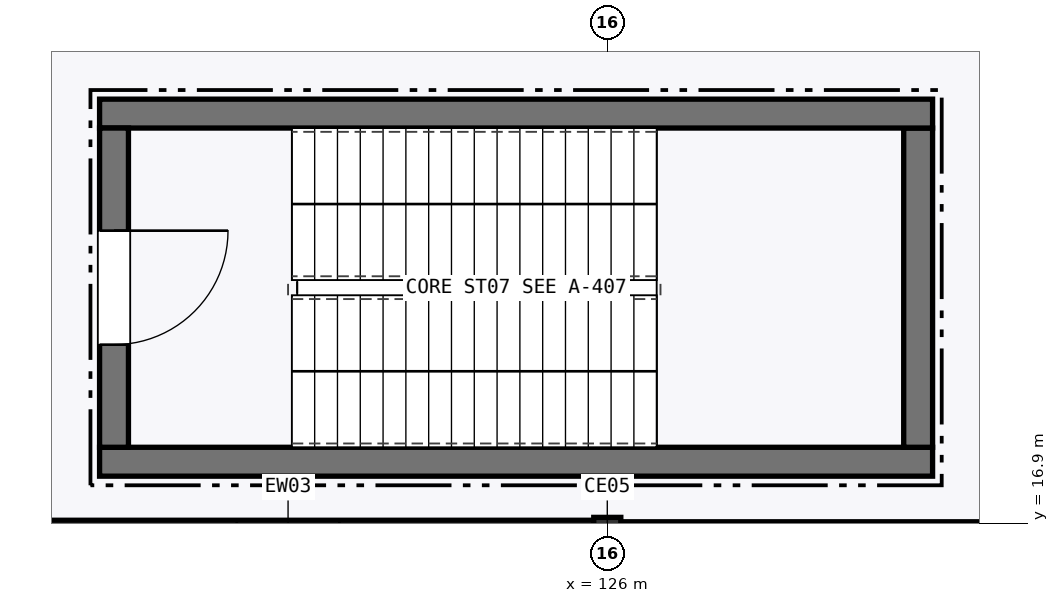
"""IFC4 building model, lengths in metres.
Left out: names, types, materials, properties, quantities, classifications, styles, units other than length and angle.
Written with IfcOpenShell. Run it as: python <this file> out.ifc"""

import sys

from ifc_helpers import new_model, si_unit, direction, frame, frame_2d, origin, origin_2d, place, context, subcontext, project, spatial, rectangle, hollow_circle, extrude, element, fill, save


model = new_model("IFC4")
c1 = context("Model", 3, precision=1e-05, world=origin(), true_north=direction((0.0, 1.0)))
c2 = subcontext(c1, "Body", "Model", "MODEL_VIEW")
j1 = project(units=[si_unit("LENGTHUNIT", "METRE"), si_unit("PLANEANGLEUNIT", "RADIAN")], contexts=[c1])
p1 = place(None, origin())
s1 = spatial("IfcSite", under=j1, at=p1, CompositionType="ELEMENT")
p2 = place(p1, origin())
s2 = spatial("IfcBuilding", under=s1, at=p2, CompositionType="ELEMENT")
p3 = place(p2, frame((0.0, 0.0, 21.6)))
s3 = spatial("IfcBuildingStorey", under=s2, at=p3, CompositionType="ELEMENT", Elevation=21.6)
p4 = place(p3, frame((126.0, 16.8, 0.0), z_axis=(0.0, 0.0, 1.0), x_axis=(1.0, 0.0, 0.0)))
e1 = element("IfcColumn", 1, at=p4, inside=s3, PredefinedType="COLUMN", context=c2, shape_type="SweptSolid", body=[
    extrude(hollow_circle(Radius=0.178, WallThickness=0.014, at=origin_2d()), origin(), (0.0, 0.0, 1.0), 5.1),
])
p5 = place(p3, frame((117.773, 16.8, 0.0), z_axis=(0.0, 0.0, 1.0), x_axis=(1.0, 0.0, 0.0)))
e2 = element("IfcWall", 2, at=p5, inside=s3, PredefinedType="STANDARD", context=c2, shape_type="SweptSolid", body=[
    extrude(rectangle(XDim=8.054, YDim=0.28, at=frame_2d((4.027, 0.0))), origin(), (0.0, 0.0, 1.0), 4.397),
])
p6 = place(p5, frame((3.352, 0.0, 0.95)))
e3 = element("IfcOpeningElement", 3, at=p6, cuts=e2, PredefinedType="OPENING", context=c2, shape_type="SweptSolid", body=[
    extrude(rectangle(XDim=1.35, YDim=2.1, at=frame_2d((0.675, 1.05))), frame((0.0, 0.15, 0.0), z_axis=(0.0, -1.0, 0.0), x_axis=(1.0, 0.0, 0.0)), (0.0, 0.0, 1.0), 0.3),
])
p7 = place(p3, frame((126.173, 16.8, 0.0), z_axis=(0.0, 0.0, 1.0), x_axis=(1.0, 0.0, 0.0)))
e4 = element("IfcWall", 4, at=p7, inside=s3, PredefinedType="STANDARD", context=c2, shape_type="SweptSolid", body=[
    extrude(rectangle(XDim=8.054, YDim=0.24, at=frame_2d((4.027, 0.0))), origin(), (0.0, 0.0, 1.0), 4.397),
])
p8 = place(p7, frame((3.277, 0.0, 0.95)))
e5 = element("IfcOpeningElement", 5, at=p8, cuts=e4, PredefinedType="OPENING", context=c2, shape_type="SweptSolid", body=[
    extrude(rectangle(XDim=1.5, YDim=2.1, at=frame_2d((0.75, 1.05))), frame((0.0, 0.13, 0.0), z_axis=(0.0, -1.0, 0.0), x_axis=(1.0, 0.0, 0.0)), (0.0, 0.0, 1.0), 0.26),
])
p9 = place(p3, frame((119.32, 17.71, 0.0), z_axis=(0.0, 0.0, 1.0), x_axis=(1.0, 0.0, 0.0)))
e6 = element("IfcWall", 6, at=p9, inside=s3, PredefinedType="SHEAR", context=c2, shape_type="SweptSolid", body=[
    extrude(rectangle(XDim=10.96, YDim=0.38, at=frame_2d((5.48, 0.0))), origin(), (0.0, 0.0, 1.0), 4.845),
])
p10 = place(p3, frame((130.09, 17.9, 0.0), z_axis=(0.0, 0.0, 1.0), x_axis=(0.0, 1.0, 0.0)))
e7 = element("IfcWall", 7, at=p10, inside=s3, PredefinedType="SHEAR", context=c2, shape_type="SweptSolid", body=[
    extrude(rectangle(XDim=4.2, YDim=0.38, at=frame_2d((2.1, 0.0))), origin(), (0.0, 0.0, 1.0), 4.845),
])
p11 = place(p3, frame((130.28, 22.29, 0.0), z_axis=(0.0, 0.0, 1.0), x_axis=(-1.0, 0.0, 0.0)))
e8 = element("IfcWall", 8, at=p11, inside=s3, PredefinedType="SHEAR", context=c2, shape_type="SweptSolid", body=[
    extrude(rectangle(XDim=10.96, YDim=0.38, at=frame_2d((5.48, 0.0))), origin(), (0.0, 0.0, 1.0), 4.845),
])
p12 = place(p3, frame((119.51, 22.1, 0.0), z_axis=(0.0, 0.0, 1.0), x_axis=(0.0, -1.0, 0.0)))
e9 = element("IfcWall", 9, at=p12, inside=s3, PredefinedType="SHEAR", context=c2, shape_type="SweptSolid", body=[
    extrude(rectangle(XDim=4.2, YDim=0.38, at=frame_2d((2.1, 0.0))), origin(), (0.0, 0.0, 1.0), 4.845),
])
p13 = place(p12, frame((1.35, 0.0, 0.0)))
e10 = element("IfcOpeningElement", 10, at=p13, cuts=e9, PredefinedType="OPENING", context=c2, shape_type="SweptSolid", body=[
    extrude(rectangle(XDim=1.5, YDim=2.15, at=frame_2d((0.75, 1.075))), frame((0.0, 0.2, 0.0), z_axis=(0.0, -1.0, 0.0), x_axis=(1.0, 0.0, 0.0)), (0.0, 0.0, 1.0), 0.4),
])
p14 = place(p13, origin())
e11 = element("IfcDoor", 11, at=p14, inside=s3, OperationType="SINGLE_SWING_LEFT", PredefinedType="DOOR", context=c2, shape_type="SweptSolid", body=[
    extrude(rectangle(XDim=1.5, YDim=2.15, at=frame_2d((0.75, 1.075))), frame((0.0, 0.025, 0.0), z_axis=(0.0, -1.0, 0.0), x_axis=(1.0, 0.0, 0.0)), (0.0, 0.0, 1.0), 0.05),
])
fill(e10, e11)
save(model, sys.argv[1])
